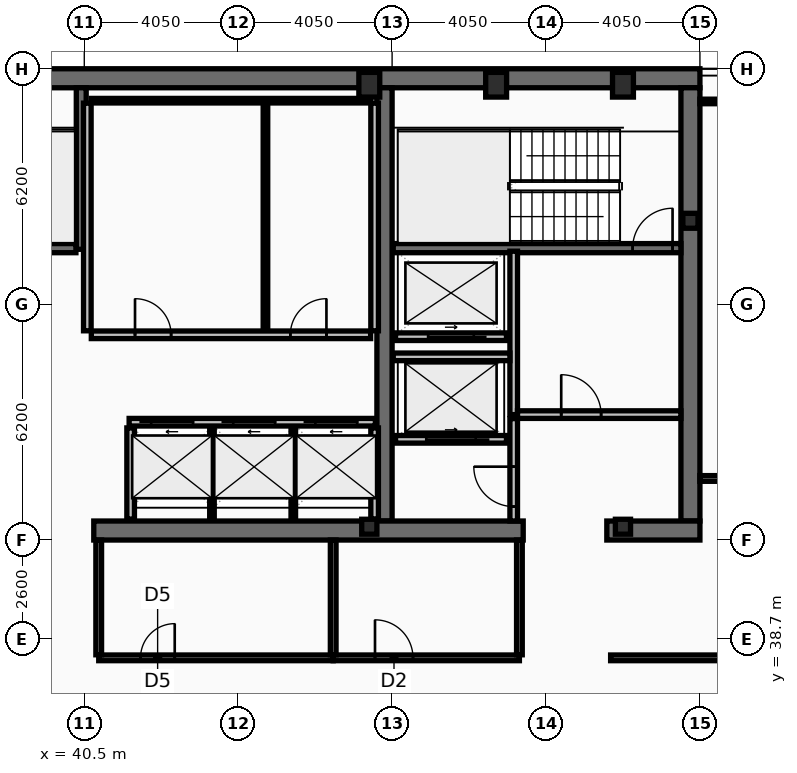
"""IFC4 building model, lengths in metres.
Left out: names, types, materials, properties, quantities, classifications, styles, units other than length and angle.
Written with IfcOpenShell. Run it as: python <this file> out.ifc"""

import sys

from ifc_helpers import new_model, si_unit, direction, frame, frame_2d, origin, origin_2d, place, context, subcontext, project, spatial, rectangle, hollow_rectangle, i_section, extrude, element, fill, save


model = new_model("IFC4")
c1 = context("Model", 3, precision=1e-05, world=origin(), true_north=direction((0.0, 1.0)))
c2 = subcontext(c1, "Body", "Model", "MODEL_VIEW")
j1 = project(units=[si_unit("LENGTHUNIT", "METRE"), si_unit("PLANEANGLEUNIT", "RADIAN")], contexts=[c1])
p1 = place(None, origin())
s1 = spatial("IfcSite", under=j1, at=p1, CompositionType="ELEMENT")
p2 = place(p1, origin())
s2 = spatial("IfcBuilding", under=s1, at=p2, CompositionType="ELEMENT")
p3 = place(p2, frame((0.0, 0.0, 298.6)))
s3 = spatial("IfcBuildingStorey", under=s2, at=p3, CompositionType="ELEMENT", Elevation=298.6)
p4 = place(p3, frame((16.2, 53.45, 0.0), z_axis=(0.0, 0.0, 1.0), x_axis=(1.0, 0.0, 0.0)))
e1 = element("IfcWall", 1, at=p4, inside=s3, PredefinedType="SHEAR", context=c2, shape_type="SweptSolid", body=[
    extrude(rectangle(XDim=40.5, YDim=0.5, at=frame_2d((20.25, 0.0))), origin(), (0.0, 0.0, 1.0), 3.44),
])
p5 = place(p3, frame((56.45, 53.2, 0.0), z_axis=(0.0, 0.0, 1.0), x_axis=(0.0, -1.0, 0.0)))
e2 = element("IfcWall", 2, at=p5, inside=s3, PredefinedType="SHEAR", context=c2, shape_type="SweptSolid", body=[
    extrude(rectangle(XDim=11.4, YDim=0.5, at=frame_2d((5.7, 0.0))), origin(), (0.0, 0.0, 1.0), 3.44),
])
p6 = place(p3, frame((48.4, 41.8, 0.0), z_axis=(0.0, 0.0, 1.0), x_axis=(0.0, 1.0, 0.0)))
e3 = element("IfcWall", 3, at=p6, inside=s3, PredefinedType="SHEAR", context=c2, shape_type="SweptSolid", body=[
    extrude(rectangle(XDim=11.4, YDim=0.4, at=frame_2d((5.7, 0.0))), origin(), (0.0, 0.0, 1.0), 3.44),
])
p7 = place(p3, frame((52.05, 41.55, 0.0), z_axis=(0.0, 0.0, 1.0), x_axis=(-1.0, 0.0, 0.0)))
e4 = element("IfcWall", 4, at=p7, inside=s3, PredefinedType="SHEAR", context=c2, shape_type="SweptSolid", body=[
    extrude(rectangle(XDim=11.3, YDim=0.5, at=frame_2d((5.65, 0.0))), origin(), (0.0, 0.0, 1.0), 3.44),
])
p8 = place(p3, frame((56.7, 41.55, 0.0), z_axis=(0.0, 0.0, 1.0), x_axis=(-1.0, 0.0, 0.0)))
e5 = element("IfcWall", 5, at=p8, inside=s3, PredefinedType="SHEAR", context=c2, shape_type="SweptSolid", body=[
    extrude(rectangle(XDim=2.45, YDim=0.5, at=frame_2d((1.225, 0.0))), origin(), (0.0, 0.0, 1.0), 3.44),
])
p9 = place(p3, frame((40.42, 48.95, 0.0), z_axis=(0.0, 0.0, 1.0), x_axis=(0.0, 1.0, 0.0)))
e6 = element("IfcWall", 6, at=p9, inside=s3, PredefinedType="SHEAR", context=c2, shape_type="SweptSolid", body=[
    extrude(rectangle(XDim=4.25, YDim=0.26, at=frame_2d((2.125, 0.0))), origin(), (0.0, 0.0, 1.0), 3.44),
])
p10 = place(p3, frame((48.63, 48.98, 0.0), z_axis=(0.0, 0.0, 1.0), x_axis=(1.0, 0.0, 0.0)))
e7 = element("IfcWall", 7, at=p10, inside=s3, PredefinedType="SHEAR", context=c2, shape_type="SweptSolid", body=[
    extrude(rectangle(XDim=7.57, YDim=0.24, at=frame_2d((3.785, 0.0))), origin(), (0.0, 0.0, 1.0), 3.44),
])
p11 = place(p10, frame((6.3, 0.0, 0.0)))
e8 = element("IfcOpeningElement", 8, at=p11, cuts=e7, PredefinedType="OPENING", context=c2, shape_type="SweptSolid", body=[
    extrude(rectangle(XDim=1.05, YDim=2.15, at=frame_2d((0.525, 1.075))), frame((0.0, 0.13, 0.0), z_axis=(0.0, -1.0, 0.0), x_axis=(1.0, 0.0, 0.0)), (0.0, 0.0, 1.0), 0.26),
])
p12 = place(p3, frame((32.72, 48.98, 0.0), z_axis=(0.0, 0.0, 1.0), x_axis=(1.0, 0.0, 0.0)))
e9 = element("IfcWall", 9, at=p12, inside=s3, PredefinedType="SHEAR", context=c2, shape_type="SweptSolid", body=[
    extrude(rectangle(XDim=7.56, YDim=0.24, at=frame_2d((3.78, 0.0))), origin(), (0.0, 0.0, 1.0), 3.44),
])
p13 = place(p12, frame((0.22, 0.0, 0.0)))
e10 = element("IfcOpeningElement", 10, at=p13, cuts=e9, PredefinedType="OPENING", context=c2, shape_type="SweptSolid", body=[
    extrude(rectangle(XDim=1.05, YDim=2.15, at=frame_2d((0.525, 1.075))), frame((0.0, 0.13, 0.0), z_axis=(0.0, -1.0, 0.0), x_axis=(1.0, 0.0, 0.0)), (0.0, 0.0, 1.0), 0.26),
])
for number, where, z_axis, x_axis in (
    (11, (48.0, 53.28, 0.0), (0.0, 0.0, 1.0), (1.0, 0.0, 0.0)),
    (12, (51.337, 53.28, 0.0), (0.0, 0.0, 1.0), (1.0, 0.0, 0.0)),
    (13, (54.675, 53.28, 0.0), (0.0, 0.0, 1.0), (1.0, 0.0, 0.0)),
):
    element("IfcColumn", number, at=place(p3, frame(where, z_axis=z_axis, x_axis=x_axis)), inside=s3, PredefinedType="COLUMN", context=c2, shape_type="SweptSolid", body=[
        extrude(hollow_rectangle(XDim=0.55, YDim=0.65, WallThickness=0.04, at=origin_2d()), origin(), (0.0, 0.0, 1.0), 3.6),
    ])
for number, where, z_axis, x_axis in (
    (14, (56.45, 49.7, 0.0), (0.0, 0.0, 1.0), (1.0, 0.0, 0.0)),
    (15, (48.0, 41.65, 0.0), (0.0, 0.0, 1.0), (1.0, 0.0, 0.0)),
    (16, (54.675, 41.65, 0.0), (0.0, 0.0, 1.0), (1.0, 0.0, 0.0)),
):
    element("IfcColumn", number, at=place(p3, frame(where, z_axis=z_axis, x_axis=x_axis)), inside=s3, PredefinedType="COLUMN", context=c2, shape_type="SweptSolid", body=[
        extrude(i_section(OverallWidth=0.399, OverallDepth=0.393, WebThickness=0.023, FlangeThickness=0.037, at=origin_2d()), origin(), (0.0, 0.0, 1.0), 3.6),
    ])
p14 = place(p3, frame((41.68, 44.4, 0.0), z_axis=(0.0, 0.0, 1.0), x_axis=(1.0, 0.0, 0.0)))
e17 = element("IfcWall", 17, at=p14, inside=s3, PredefinedType="PARTITIONING", context=c2, shape_type="SweptSolid", body=[
    extrude(rectangle(XDim=6.48, YDim=0.2, at=frame_2d((3.24, 0.0))), origin(), (0.0, 0.0, 1.0), 3.44),
])
p15 = place(p14, frame((0.58, 0.0, 0.0)))
e18 = element("IfcOpeningElement", 18, at=p15, cuts=e17, PredefinedType="OPENING", context=c2, shape_type="SweptSolid", body=[
    extrude(rectangle(XDim=1.1, YDim=2.18, at=frame_2d((0.55, 1.09))), frame((0.0, 0.11, 0.0), z_axis=(0.0, -1.0, 0.0), x_axis=(1.0, 0.0, 0.0)), (0.0, 0.0, 1.0), 0.22),
])
p16 = place(p14, frame((2.74, 0.0, 0.0)))
e19 = element("IfcOpeningElement", 19, at=p16, cuts=e17, PredefinedType="OPENING", context=c2, shape_type="SweptSolid", body=[
    extrude(rectangle(XDim=1.1, YDim=2.18, at=frame_2d((0.55, 1.09))), frame((0.0, 0.11, 0.0), z_axis=(0.0, -1.0, 0.0), x_axis=(1.0, 0.0, 0.0)), (0.0, 0.0, 1.0), 0.22),
])
p17 = place(p14, frame((4.9, 0.0, 0.0)))
e20 = element("IfcOpeningElement", 20, at=p17, cuts=e17, PredefinedType="OPENING", context=c2, shape_type="SweptSolid", body=[
    extrude(rectangle(XDim=1.1, YDim=2.18, at=frame_2d((0.55, 1.09))), frame((0.0, 0.11, 0.0), z_axis=(0.0, -1.0, 0.0), x_axis=(1.0, 0.0, 0.0)), (0.0, 0.0, 1.0), 0.22),
])
p18 = place(p3, frame((51.61, 43.95, 0.0), z_axis=(0.0, 0.0, 1.0), x_axis=(-1.0, 0.0, 0.0)))
e21 = element("IfcWall", 21, at=p18, inside=s3, PredefinedType="PARTITIONING", context=c2, shape_type="SweptSolid", body=[
    extrude(rectangle(XDim=2.92, YDim=0.2, at=frame_2d((1.46, 0.0))), origin(), (0.0, 0.0, 1.0), 3.44),
])
p19 = place(p18, frame((0.81, 0.0, 0.0)))
e22 = element("IfcOpeningElement", 22, at=p19, cuts=e21, PredefinedType="OPENING", context=c2, shape_type="SweptSolid", body=[
    extrude(rectangle(XDim=1.3, YDim=2.18, at=frame_2d((0.65, 1.09))), frame((0.0, 0.11, 0.0), z_axis=(0.0, -1.0, 0.0), x_axis=(1.0, 0.0, 0.0)), (0.0, 0.0, 1.0), 0.22),
])
p20 = place(p3, frame((51.61, 46.65, 0.0), z_axis=(0.0, 0.0, 1.0), x_axis=(-1.0, 0.0, 0.0)))
e23 = element("IfcWall", 23, at=p20, inside=s3, PredefinedType="PARTITIONING", context=c2, shape_type="SweptSolid", body=[
    extrude(rectangle(XDim=2.92, YDim=0.2, at=frame_2d((1.46, 0.0))), origin(), (0.0, 0.0, 1.0), 3.44),
])
p21 = place(p20, frame((0.86, 0.0, 0.0)))
e24 = element("IfcOpeningElement", 24, at=p21, cuts=e23, PredefinedType="OPENING", context=c2, shape_type="SweptSolid", body=[
    extrude(rectangle(XDim=1.2, YDim=2.18, at=frame_2d((0.6, 1.09))), frame((0.0, 0.11, 0.0), z_axis=(0.0, -1.0, 0.0), x_axis=(1.0, 0.0, 0.0)), (0.0, 0.0, 1.0), 0.22),
])
p22 = place(p3, frame((51.8, 44.6, 0.0), z_axis=(0.0, 0.0, 1.0), x_axis=(0.0, 1.0, 0.0)))
e25 = element("IfcWall", 25, at=p22, inside=s3, PredefinedType="PARTITIONING", context=c2, shape_type="SweptSolid", body=[
    extrude(rectangle(XDim=4.3, YDim=0.2, at=frame_2d((2.15, 0.0))), origin(), (0.0, 0.0, 1.0), 3.44),
])
p23 = place(p3, frame((51.9, 44.6, 0.0), z_axis=(0.0, 0.0, 1.0), x_axis=(1.0, 0.0, 0.0)))
e26 = element("IfcWall", 26, at=p23, inside=s3, PredefinedType="PARTITIONING", context=c2, shape_type="SweptSolid", body=[
    extrude(rectangle(XDim=4.3, YDim=0.2, at=frame_2d((2.15, 0.0))), origin(), (0.0, 0.0, 1.0), 3.44),
])
p24 = place(p23, frame((1.15, 0.0, 0.0)))
e27 = element("IfcOpeningElement", 27, at=p24, cuts=e26, PredefinedType="OPENING", context=c2, shape_type="SweptSolid", body=[
    extrude(rectangle(XDim=1.05, YDim=2.15, at=frame_2d((0.525, 1.075))), frame((0.0, 0.11, 0.0), z_axis=(0.0, -1.0, 0.0), x_axis=(1.0, 0.0, 0.0)), (0.0, 0.0, 1.0), 0.22),
])
p25 = place(p3, frame((48.63, 46.12, 0.0), z_axis=(0.0, 0.0, 1.0), x_axis=(1.0, 0.0, 0.0)))
e28 = element("IfcWall", 28, at=p25, inside=s3, PredefinedType="PARTITIONING", context=c2, shape_type="SweptSolid", body=[
    extrude(rectangle(XDim=3.07, YDim=0.2, at=frame_2d((1.535, 0.0))), origin(), (0.0, 0.0, 1.0), 3.44),
])
p26 = place(p3, frame((51.8, 41.8, 0.0), z_axis=(0.0, 0.0, 1.0), x_axis=(0.0, 1.0, 0.0)))
e29 = element("IfcWall", 29, at=p26, inside=s3, PredefinedType="PARTITIONING", context=c2, shape_type="SweptSolid", body=[
    extrude(rectangle(XDim=2.695, YDim=0.2, at=frame_2d((1.348, 0.0))), origin(), (0.0, 0.0, 1.0), 3.44),
])
p27 = place(p26, frame((0.38, 0.0, 0.0)))
e30 = element("IfcOpeningElement", 30, at=p27, cuts=e29, PredefinedType="OPENING", context=c2, shape_type="SweptSolid", body=[
    extrude(rectangle(XDim=1.05, YDim=2.15, at=frame_2d((0.525, 1.075))), frame((0.0, 0.11, 0.0), z_axis=(0.0, -1.0, 0.0), x_axis=(1.0, 0.0, 0.0)), (0.0, 0.0, 1.0), 0.22),
])
for number, where, z_axis, x_axis in (
    (31, (40.58, 46.805, 0.0), (0.0, 0.0, 1.0), (0.0, 1.0, 0.0)),
    (32, (48.14, 46.805, 0.0), (0.0, 0.0, 1.0), (0.0, 1.0, 0.0)),
):
    element("IfcWall", number, at=place(p3, frame(where, z_axis=z_axis, x_axis=x_axis)), inside=s3, PredefinedType="PARTITIONING", context=c2, shape_type="SweptSolid", body=[
        extrude(rectangle(XDim=5.99, YDim=0.2, at=frame_2d((2.995, 0.0))), origin(), (0.0, 0.0, 1.0), 3.44),
    ])
p28 = place(p3, frame((40.685, 52.86, 0.0), z_axis=(0.0, 0.0, 1.0), x_axis=(1.0, 0.0, 0.0)))
e33 = element("IfcWall", 33, at=p28, inside=s3, PredefinedType="PARTITIONING", context=c2, shape_type="SweptSolid", body=[
    extrude(rectangle(XDim=7.35, YDim=0.12, at=frame_2d((3.675, 0.0))), origin(), (0.0, 0.0, 1.0), 3.44),
])
p29 = place(p3, frame((45.267, 46.805, 0.0), z_axis=(0.0, 0.0, 1.0), x_axis=(0.0, 1.0, 0.0)))
e34 = element("IfcWall", 34, at=p29, inside=s3, PredefinedType="PARTITIONING", context=c2, shape_type="SweptSolid", body=[
    extrude(rectangle(XDim=5.99, YDim=0.12, at=frame_2d((2.995, 0.0))), origin(), (0.0, 0.0, 1.0), 3.44),
])
p30 = place(p3, frame((40.685, 46.7, 0.0), z_axis=(0.0, 0.0, 1.0), x_axis=(1.0, 0.0, 0.0)))
e35 = element("IfcWall", 35, at=p30, inside=s3, PredefinedType="PARTITIONING", context=c2, shape_type="SweptSolid", body=[
    extrude(rectangle(XDim=7.35, YDim=0.2, at=frame_2d((3.675, 0.0))), origin(), (0.0, 0.0, 1.0), 3.44),
])
p31 = place(p30, frame((1.15, 0.0, 0.0)))
e36 = element("IfcOpeningElement", 36, at=p31, cuts=e35, PredefinedType="OPENING", context=c2, shape_type="SweptSolid", body=[
    extrude(rectangle(XDim=0.95, YDim=2.1, at=frame_2d((0.475, 1.05))), frame((0.0, 0.11, 0.0), z_axis=(0.0, -1.0, 0.0), x_axis=(1.0, 0.0, 0.0)), (0.0, 0.0, 1.0), 0.22),
])
p32 = place(p30, frame((5.237, 0.0, 0.0)))
e37 = element("IfcOpeningElement", 37, at=p32, cuts=e35, PredefinedType="OPENING", context=c2, shape_type="SweptSolid", body=[
    extrude(rectangle(XDim=0.95, YDim=2.1, at=frame_2d((0.475, 1.05))), frame((0.0, 0.11, 0.0), z_axis=(0.0, -1.0, 0.0), x_axis=(1.0, 0.0, 0.0)), (0.0, 0.0, 1.0), 0.22),
])
for number, where, z_axis, x_axis in (
    (38, (41.72, 41.85, 0.0), (0.0, 0.0, 1.0), (0.0, 1.0, 0.0)),
    (39, (48.14, 41.85, 0.0), (0.0, 0.0, 1.0), (0.0, 1.0, 0.0)),
):
    element("IfcWall", number, at=place(p3, frame(where, z_axis=z_axis, x_axis=x_axis)), inside=s3, PredefinedType="PARTITIONING", context=c2, shape_type="SweptSolid", body=[
        extrude(rectangle(XDim=2.4, YDim=0.2, at=frame_2d((1.2, 0.0))), origin(), (0.0, 0.0, 1.0), 3.44),
    ])
for number, where, z_axis, x_axis in (
    (40, (43.86, 41.85, 0.0), (0.0, 0.0, 1.0), (0.0, 1.0, 0.0)),
    (41, (46.0, 41.85, 0.0), (0.0, 0.0, 1.0), (0.0, 1.0, 0.0)),
):
    element("IfcWall", number, at=place(p3, frame(where, z_axis=z_axis, x_axis=x_axis)), inside=s3, PredefinedType="PARTITIONING", context=c2, shape_type="SweptSolid", body=[
        extrude(rectangle(XDim=2.4, YDim=0.12, at=frame_2d((1.2, 0.0))), origin(), (0.0, 0.0, 1.0), 3.44),
    ])
p33 = place(p3, frame((40.88, 38.2, 0.0), z_axis=(0.0, 0.0, 1.0), x_axis=(1.0, 0.0, 0.0)))
e42 = element("IfcWall", 42, at=p33, inside=s3, PredefinedType="PARTITIONING", context=c2, shape_type="SweptSolid", body=[
    extrude(rectangle(XDim=6.17, YDim=0.15, at=frame_2d((3.085, 0.0))), origin(), (0.0, 0.0, 1.0), 2.78),
])
p34 = place(p33, frame((1.1, 0.0, 0.0)))
e43 = element("IfcOpeningElement", 43, at=p34, cuts=e42, PredefinedType="OPENING", context=c2, shape_type="SweptSolid", body=[
    extrude(rectangle(XDim=0.9, YDim=2.05, at=frame_2d((0.45, 1.025))), frame((0.0, 0.085, 0.0), z_axis=(0.0, -1.0, 0.0), x_axis=(1.0, 0.0, 0.0)), (0.0, 0.0, 1.0), 0.17),
])
p35 = place(p3, frame((47.05, 38.2, 0.0), z_axis=(0.0, 0.0, 1.0), x_axis=(1.0, 0.0, 0.0)))
e44 = element("IfcWall", 44, at=p35, inside=s3, PredefinedType="PARTITIONING", context=c2, shape_type="SweptSolid", body=[
    extrude(rectangle(XDim=4.9, YDim=0.15, at=frame_2d((2.45, 0.0))), origin(), (0.0, 0.0, 1.0), 2.78),
])
p36 = place(p35, frame((1.1, 0.0, 0.0)))
e45 = element("IfcOpeningElement", 45, at=p36, cuts=e44, PredefinedType="OPENING", context=c2, shape_type="SweptSolid", body=[
    extrude(rectangle(XDim=1.0, YDim=2.05, at=frame_2d((0.5, 1.025))), frame((0.0, 0.085, 0.0), z_axis=(0.0, -1.0, 0.0), x_axis=(1.0, 0.0, 0.0)), (0.0, 0.0, 1.0), 0.17),
])
for number, where, z_axis, x_axis in (
    (46, (40.88, 38.28, 0.0), (0.0, 0.0, 1.0), (0.0, 1.0, 0.0)),
    (47, (47.05, 38.28, 0.0), (0.0, 0.0, 1.0), (0.0, 1.0, 0.0)),
    (48, (51.95, 38.28, 0.0), (0.0, 0.0, 1.0), (0.0, 1.0, 0.0)),
):
    element("IfcWall", number, at=place(p3, frame(where, z_axis=z_axis, x_axis=x_axis)), inside=s3, PredefinedType="PARTITIONING", context=c2, shape_type="SweptSolid", body=[
        extrude(rectangle(XDim=3.02, YDim=0.15, at=frame_2d((1.51, 0.0))), origin(), (0.0, 0.0, 1.0), 3.44),
    ])
p37 = place(p3, frame((54.35, 38.2, 0.0), z_axis=(0.0, 0.0, 1.0), x_axis=(1.0, 0.0, 0.0)))
e49 = element("IfcWall", 49, at=p37, inside=s3, PredefinedType="PARTITIONING", context=c2, shape_type="SweptSolid", body=[
    extrude(rectangle(XDim=6.52, YDim=0.15, at=frame_2d((3.26, 0.0))), origin(), (0.0, 0.0, 1.0), 2.78),
])
p38 = place(p37, frame((3.25, 0.0, 0.0)))
e50 = element("IfcOpeningElement", 50, at=p38, cuts=e49, PredefinedType="OPENING", context=c2, shape_type="SweptSolid", body=[
    extrude(rectangle(XDim=0.95, YDim=2.05, at=frame_2d((0.475, 1.025))), frame((0.0, 0.085, 0.0), z_axis=(0.0, -1.0, 0.0), x_axis=(1.0, 0.0, 0.0)), (0.0, 0.0, 1.0), 0.17),
])
p39 = place(p3, frame((56.7, 42.92, 0.0), z_axis=(0.0, 0.0, 1.0), x_axis=(1.0, 0.0, 0.0)))
e51 = element("IfcWall", 51, at=p39, inside=s3, PredefinedType="PARTITIONING", context=c2, shape_type="SweptSolid", body=[
    extrude(rectangle(XDim=4.105, YDim=0.15, at=frame_2d((2.052, 0.0))), origin(), (0.0, 0.0, 1.0), 2.78),
])
p40 = place(p39, frame((0.9, 0.0, 0.0)))
e52 = element("IfcOpeningElement", 52, at=p40, cuts=e51, PredefinedType="OPENING", context=c2, shape_type="SweptSolid", body=[
    extrude(rectangle(XDim=0.9, YDim=2.05, at=frame_2d((0.45, 1.025))), frame((0.0, 0.085, 0.0), z_axis=(0.0, -1.0, 0.0), x_axis=(1.0, 0.0, 0.0)), (0.0, 0.0, 1.0), 0.17),
])
p41 = place(p3, frame((56.7, 52.84, 0.0), z_axis=(0.0, 0.0, 1.0), x_axis=(1.0, 0.0, 0.0)))
e53 = element("IfcWall", 53, at=p41, inside=s3, PredefinedType="PARTITIONING", context=c2, shape_type="SweptSolid", body=[
    extrude(rectangle(XDim=4.105, YDim=0.12, at=frame_2d((2.052, 0.0))), origin(), (0.0, 0.0, 1.0), 3.44),
])
p42 = place(p11, origin())
e54 = element("IfcDoor", 54, at=p42, inside=s3, OperationType="SINGLE_SWING_RIGHT", PredefinedType="DOOR", context=c2, shape_type="SweptSolid", body=[
    extrude(rectangle(XDim=1.05, YDim=2.15, at=frame_2d((0.525, 1.075))), frame((0.0, 0.025, 0.0), z_axis=(0.0, -1.0, 0.0), x_axis=(1.0, 0.0, 0.0)), (0.0, 0.0, 1.0), 0.05),
])
fill(e8, e54)
p43 = place(p15, origin())
e55 = element("IfcDoor", 55, at=p43, inside=s3, OperationType="SLIDING_TO_LEFT", PredefinedType="DOOR", context=c2, shape_type="SweptSolid", body=[
    extrude(rectangle(XDim=1.1, YDim=2.18, at=frame_2d((0.55, 1.09))), frame((0.0, 0.025, 0.0), z_axis=(0.0, -1.0, 0.0), x_axis=(1.0, 0.0, 0.0)), (0.0, 0.0, 1.0), 0.05),
])
fill(e18, e55)
p44 = place(p16, origin())
e56 = element("IfcDoor", 56, at=p44, inside=s3, OperationType="SLIDING_TO_LEFT", PredefinedType="DOOR", context=c2, shape_type="SweptSolid", body=[
    extrude(rectangle(XDim=1.1, YDim=2.18, at=frame_2d((0.55, 1.09))), frame((0.0, 0.025, 0.0), z_axis=(0.0, -1.0, 0.0), x_axis=(1.0, 0.0, 0.0)), (0.0, 0.0, 1.0), 0.05),
])
fill(e19, e56)
p45 = place(p17, origin())
e57 = element("IfcDoor", 57, at=p45, inside=s3, OperationType="SLIDING_TO_LEFT", PredefinedType="DOOR", context=c2, shape_type="SweptSolid", body=[
    extrude(rectangle(XDim=1.1, YDim=2.18, at=frame_2d((0.55, 1.09))), frame((0.0, 0.025, 0.0), z_axis=(0.0, -1.0, 0.0), x_axis=(1.0, 0.0, 0.0)), (0.0, 0.0, 1.0), 0.05),
])
fill(e20, e57)
p46 = place(p19, origin())
e58 = element("IfcDoor", 58, at=p46, inside=s3, OperationType="SLIDING_TO_LEFT", PredefinedType="DOOR", context=c2, shape_type="SweptSolid", body=[
    extrude(rectangle(XDim=1.3, YDim=2.18, at=frame_2d((0.65, 1.09))), frame((0.0, 0.025, 0.0), z_axis=(0.0, -1.0, 0.0), x_axis=(1.0, 0.0, 0.0)), (0.0, 0.0, 1.0), 0.05),
])
fill(e22, e58)
p47 = place(p21, origin())
e59 = element("IfcDoor", 59, at=p47, inside=s3, OperationType="SLIDING_TO_LEFT", PredefinedType="DOOR", context=c2, shape_type="SweptSolid", body=[
    extrude(rectangle(XDim=1.2, YDim=2.18, at=frame_2d((0.6, 1.09))), frame((0.0, 0.025, 0.0), z_axis=(0.0, -1.0, 0.0), x_axis=(1.0, 0.0, 0.0)), (0.0, 0.0, 1.0), 0.05),
])
fill(e24, e59)
p48 = place(p24, origin())
e60 = element("IfcDoor", 60, at=p48, inside=s3, OperationType="SINGLE_SWING_LEFT", PredefinedType="DOOR", context=c2, shape_type="SweptSolid", body=[
    extrude(rectangle(XDim=1.05, YDim=2.15, at=frame_2d((0.525, 1.075))), frame((0.0, 0.025, 0.0), z_axis=(0.0, -1.0, 0.0), x_axis=(1.0, 0.0, 0.0)), (0.0, 0.0, 1.0), 0.05),
])
fill(e27, e60)
p49 = place(p27, origin())
e61 = element("IfcDoor", 61, at=p49, inside=s3, OperationType="SINGLE_SWING_RIGHT", PredefinedType="DOOR", context=c2, shape_type="SweptSolid", body=[
    extrude(rectangle(XDim=1.05, YDim=2.15, at=frame_2d((0.525, 1.075))), frame((0.0, 0.025, 0.0), z_axis=(0.0, -1.0, 0.0), x_axis=(1.0, 0.0, 0.0)), (0.0, 0.0, 1.0), 0.05),
])
fill(e30, e61)
p50 = place(p31, origin())
e62 = element("IfcDoor", 62, at=p50, inside=s3, OperationType="SINGLE_SWING_LEFT", PredefinedType="DOOR", context=c2, shape_type="SweptSolid", body=[
    extrude(rectangle(XDim=0.95, YDim=2.1, at=frame_2d((0.475, 1.05))), frame((0.0, 0.025, 0.0), z_axis=(0.0, -1.0, 0.0), x_axis=(1.0, 0.0, 0.0)), (0.0, 0.0, 1.0), 0.05),
])
fill(e36, e62)
p51 = place(p32, origin())
e63 = element("IfcDoor", 63, at=p51, inside=s3, OperationType="SINGLE_SWING_RIGHT", PredefinedType="DOOR", context=c2, shape_type="SweptSolid", body=[
    extrude(rectangle(XDim=0.95, YDim=2.1, at=frame_2d((0.475, 1.05))), frame((0.0, 0.025, 0.0), z_axis=(0.0, -1.0, 0.0), x_axis=(1.0, 0.0, 0.0)), (0.0, 0.0, 1.0), 0.05),
])
fill(e37, e63)
p52 = place(p34, origin())
e64 = element("IfcDoor", 64, at=p52, inside=s3, OperationType="SINGLE_SWING_RIGHT", PredefinedType="DOOR", context=c2, shape_type="SweptSolid", body=[
    extrude(rectangle(XDim=0.9, YDim=2.05, at=frame_2d((0.45, 1.025))), frame((0.0, 0.025, 0.0), z_axis=(0.0, -1.0, 0.0), x_axis=(1.0, 0.0, 0.0)), (0.0, 0.0, 1.0), 0.05),
])
fill(e43, e64)
p53 = place(p36, origin())
e65 = element("IfcDoor", 65, at=p53, inside=s3, OperationType="SINGLE_SWING_LEFT", PredefinedType="DOOR", context=c2, shape_type="SweptSolid", body=[
    extrude(rectangle(XDim=1.0, YDim=2.05, at=frame_2d((0.5, 1.025))), frame((0.0, 0.025, 0.0), z_axis=(0.0, -1.0, 0.0), x_axis=(1.0, 0.0, 0.0)), (0.0, 0.0, 1.0), 0.05),
])
fill(e45, e65)
save(model, sys.argv[1])
